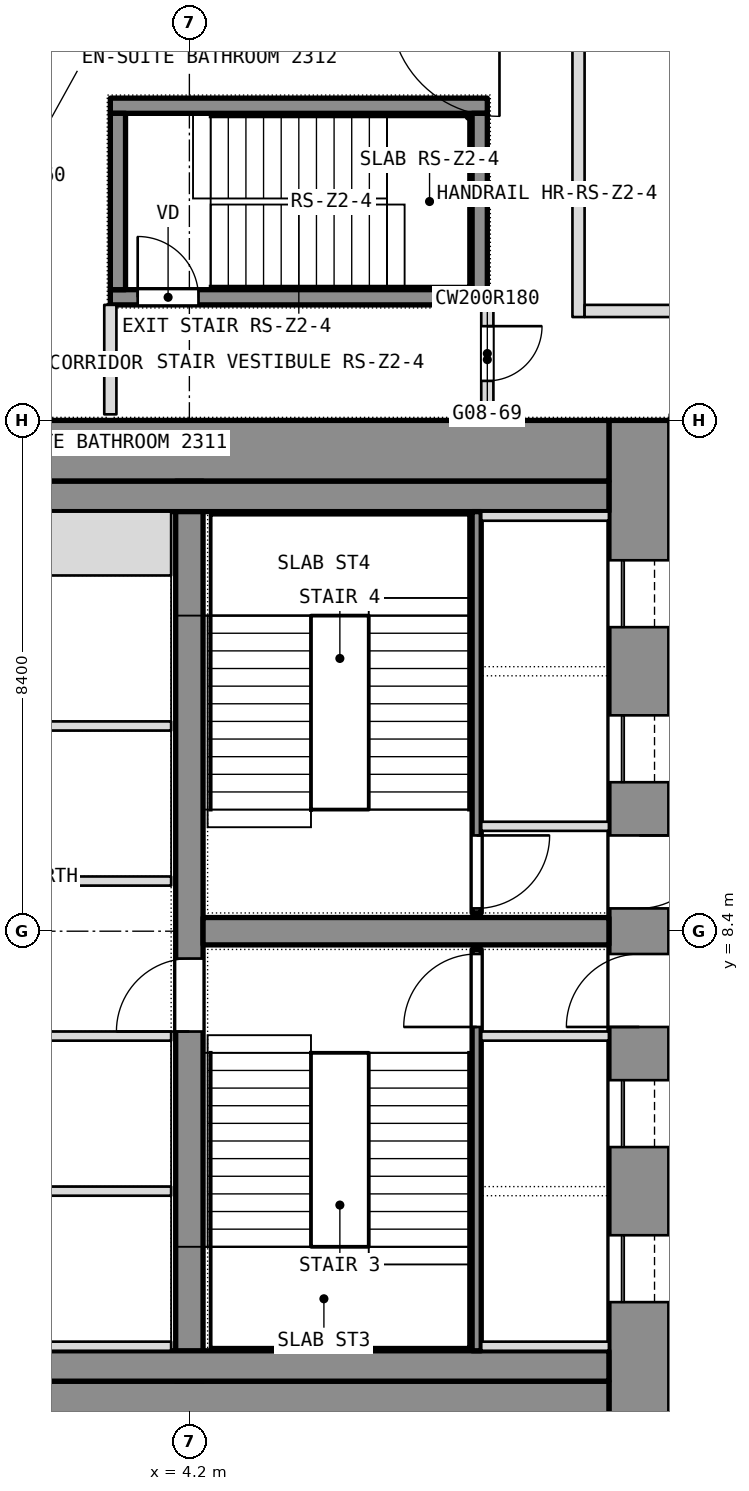
"""IFC4 building model, lengths in metres.
Left out: names, types, materials, properties, quantities, classifications, styles, units other than length and angle.
Written with IfcOpenShell. Run it as: python <this file> out.ifc"""

import sys

from ifc_helpers import new_model, si_unit, direction, frame, frame_2d, origin, place, context, subcontext, project, spatial, rectangle, extrude, element, fill, save


model = new_model("IFC4")
c1 = context("Model", 3, precision=1e-05, world=origin(), true_north=direction((0.0, 1.0)))
c2 = subcontext(c1, "Body", "Model", "MODEL_VIEW")
j1 = project(units=[si_unit("LENGTHUNIT", "METRE"), si_unit("PLANEANGLEUNIT", "RADIAN")], contexts=[c1])
p1 = place(None, origin())
s1 = spatial("IfcSite", under=j1, at=p1, CompositionType="ELEMENT")
p2 = place(p1, origin())
s2 = spatial("IfcBuilding", under=s1, at=p2, CompositionType="ELEMENT")
p3 = place(p2, frame((0.0, 0.0, 108.5)))
s3 = spatial("IfcBuildingStorey", under=s2, at=p3, CompositionType="ELEMENT", Elevation=108.5)
p4 = place(p3, frame((11.6, 0.0, 0.0), z_axis=(0.0, 0.0, 1.0), x_axis=(0.0, 1.0, 0.0)))
e1 = element("IfcWall", 1, at=p4, inside=s3, PredefinedType="SHEAR", context=c2, shape_type="SweptSolid", body=[
    extrude(rectangle(XDim=16.8, YDim=1.0, at=frame_2d((8.4, 0.0))), origin(), (0.0, 0.0, 1.0), 3.6),
])
p5 = place(p4, frame((2.3, 0.0, 0.0)))
e2 = element("IfcOpeningElement", 2, at=p5, cuts=e1, PredefinedType="OPENING", context=c2, shape_type="SweptSolid", body=[
    extrude(rectangle(XDim=1.1, YDim=2.1, at=frame_2d((0.55, 1.05))), frame((0.0, 0.5, 0.0), z_axis=(0.0, -1.0, 0.0), x_axis=(1.0, 0.0, 0.0)), (0.0, 0.0, 1.0), 1.0),
])
p6 = place(p4, frame((4.85, 0.0, 0.0)))
e3 = element("IfcOpeningElement", 3, at=p6, cuts=e1, PredefinedType="OPENING", context=c2, shape_type="SweptSolid", body=[
    extrude(rectangle(XDim=1.1, YDim=2.1, at=frame_2d((0.55, 1.05))), frame((0.0, 0.5, 0.0), z_axis=(0.0, -1.0, 0.0), x_axis=(1.0, 0.0, 0.0)), (0.0, 0.0, 1.0), 1.0),
])
p7 = place(p4, frame((6.825, 0.0, 0.0)))
e4 = element("IfcOpeningElement", 4, at=p7, cuts=e1, PredefinedType="OPENING", context=c2, shape_type="SweptSolid", body=[
    extrude(rectangle(XDim=1.2, YDim=2.1, at=frame_2d((0.6, 1.05))), frame((0.0, 0.5, 0.0), z_axis=(0.0, -1.0, 0.0), x_axis=(1.0, 0.0, 0.0)), (0.0, 0.0, 1.0), 1.0),
])
p8 = place(p4, frame((13.4, 0.0, 0.0)))
e5 = element("IfcOpeningElement", 5, at=p8, cuts=e1, PredefinedType="OPENING", context=c2, shape_type="SweptSolid", body=[
    extrude(rectangle(XDim=1.1, YDim=2.1, at=frame_2d((0.55, 1.05))), frame((0.0, 0.5, 0.0), z_axis=(0.0, -1.0, 0.0), x_axis=(1.0, 0.0, 0.0)), (0.0, 0.0, 1.0), 1.0),
])
p9 = place(p4, frame((10.85, 0.0, 0.0)))
e6 = element("IfcOpeningElement", 6, at=p9, cuts=e1, PredefinedType="OPENING", context=c2, shape_type="SweptSolid", body=[
    extrude(rectangle(XDim=1.1, YDim=2.1, at=frame_2d((0.55, 1.05))), frame((0.0, 0.5, 0.0), z_axis=(0.0, -1.0, 0.0), x_axis=(1.0, 0.0, 0.0)), (0.0, 0.0, 1.0), 1.0),
])
p10 = place(p4, frame((8.775, 0.0, 0.0)))
e7 = element("IfcOpeningElement", 7, at=p10, cuts=e1, PredefinedType="OPENING", context=c2, shape_type="SweptSolid", body=[
    extrude(rectangle(XDim=1.2, YDim=2.1, at=frame_2d((0.6, 1.05))), frame((0.0, 0.5, 0.0), z_axis=(0.0, -1.0, 0.0), x_axis=(1.0, 0.0, 0.0)), (0.0, 0.0, 1.0), 1.0),
])
for number, where, z_axis, x_axis in (
    (8, (-11.1, 0.5, 0.0), (0.0, 0.0, 1.0), (1.0, 0.0, 0.0)),
    (9, (-11.1, 16.3, 0.0), (0.0, 0.0, 1.0), (1.0, 0.0, 0.0)),
):
    element("IfcWall", number, at=place(p3, frame(where, z_axis=z_axis, x_axis=x_axis)), inside=s3, PredefinedType="SHEAR", context=c2, shape_type="SweptSolid", body=[
        extrude(rectangle(XDim=22.2, YDim=1.0, at=frame_2d((11.1, 0.0))), origin(), (0.0, 0.0, 1.0), 3.6),
    ])
p11 = place(p3, frame((4.2, 1.0, 0.0), z_axis=(0.0, 0.0, 1.0), x_axis=(0.0, 1.0, 0.0)))
e10 = element("IfcWall", 10, at=p11, inside=s3, PredefinedType="SHEAR", context=c2, shape_type="SweptSolid", body=[
    extrude(rectangle(XDim=14.8, YDim=0.45, at=frame_2d((7.4, 0.0))), origin(), (0.0, 0.0, 1.0), 3.6),
])
p12 = place(p11, frame((5.75, 0.0, 0.0)))
e11 = element("IfcOpeningElement", 11, at=p12, cuts=e10, PredefinedType="OPENING", context=c2, shape_type="SweptSolid", body=[
    extrude(rectangle(XDim=1.2, YDim=2.1, at=frame_2d((0.6, 1.05))), frame((0.0, 0.225, 0.0), z_axis=(0.0, -1.0, 0.0), x_axis=(1.0, 0.0, 0.0)), (0.0, 0.0, 1.0), 0.45),
])
p13 = place(p3, frame((4.425, 8.4, 0.0), z_axis=(0.0, 0.0, 1.0), x_axis=(1.0, 0.0, 0.0)))
e12 = element("IfcWall", 12, at=p13, inside=s3, PredefinedType="SHEAR", context=c2, shape_type="SweptSolid", body=[
    extrude(rectangle(XDim=6.675, YDim=0.45, at=frame_2d((3.337, 0.0))), origin(), (0.0, 0.0, 1.0), 3.6),
])
p14 = place(p3, frame((10.6, 18.5, 0.0), z_axis=(0.0, 0.0, 1.0), x_axis=(0.0, 1.0, 0.0)))
e13 = element("IfcWall", 13, at=p14, inside=s3, PredefinedType="PARTITIONING", context=c2, shape_type="SweptSolid", body=[
    extrude(rectangle(XDim=5.0, YDim=0.2, at=frame_2d((2.5, 0.0))), origin(), (0.0, 0.0, 1.0), 3.34),
])
p15 = place(p3, frame((9.1, 16.9, 0.0), z_axis=(0.0, 0.0, 1.0), x_axis=(0.0, 1.0, 0.0)))
e14 = element("IfcWall", 14, at=p15, inside=s3, PredefinedType="PARTITIONING", context=c2, shape_type="SweptSolid", body=[
    extrude(rectangle(XDim=1.8, YDim=0.2, at=frame_2d((0.9, 0.0))), origin(), (0.0, 0.0, 1.0), 3.34),
])
p16 = place(p15, frame((0.55, 0.0, 0.0)))
e15 = element("IfcOpeningElement", 15, at=p16, cuts=e14, PredefinedType="OPENING", context=c2, shape_type="SweptSolid", body=[
    extrude(rectangle(XDim=0.9, YDim=2.1, at=frame_2d((0.45, 1.05))), frame((0.0, 0.1, 0.0), z_axis=(0.0, -1.0, 0.0), x_axis=(1.0, 0.0, 0.0)), (0.0, 0.0, 1.0), 0.2),
])
p17 = place(p3, frame((2.9, 16.9, 0.0), z_axis=(0.0, 0.0, 1.0), x_axis=(0.0, 1.0, 0.0)))
e16 = element("IfcWall", 16, at=p17, inside=s3, PredefinedType="PARTITIONING", context=c2, shape_type="SweptSolid", body=[
    extrude(rectangle(XDim=1.8, YDim=0.2, at=frame_2d((0.9, 0.0))), origin(), (0.0, 0.0, 1.0), 3.34),
])
p18 = place(p3, frame((10.7, 18.6, 0.0), z_axis=(0.0, 0.0, 1.0), x_axis=(1.0, 0.0, 0.0)))
e17 = element("IfcWall", 17, at=p18, inside=s3, PredefinedType="PARTITIONING", context=c2, shape_type="SweptSolid", body=[
    extrude(rectangle(XDim=6.2, YDim=0.2, at=frame_2d((3.1, 0.0))), origin(), (0.0, 0.0, 1.0), 3.34),
])
p19 = place(p18, frame((2.3, 0.0, 0.0)))
e18 = element("IfcOpeningElement", 18, at=p19, cuts=e17, PredefinedType="OPENING", context=c2, shape_type="SweptSolid", body=[
    extrude(rectangle(XDim=1.0, YDim=2.1, at=frame_2d((0.5, 1.05))), frame((0.0, 0.1, 0.0), z_axis=(0.0, -1.0, 0.0), x_axis=(1.0, 0.0, 0.0)), (0.0, 0.0, 1.0), 0.2),
])
for number, where, z_axis, x_axis in (
    (19, (-11.1, 1.25, 0.0), (0.0, 0.0, 1.0), (1.0, 0.0, 0.0)),
    (20, (-11.1, 15.55, 0.0), (0.0, 0.0, 1.0), (1.0, 0.0, 0.0)),
):
    element("IfcWall", number, at=place(p3, frame(where, z_axis=z_axis, x_axis=x_axis)), inside=s3, PredefinedType="PARTITIONING", context=c2, shape_type="SweptSolid", body=[
        extrude(rectangle(XDim=22.2, YDim=0.5, at=frame_2d((11.1, 0.0))), origin(), (0.0, 0.0, 1.0), 3.34),
    ])
p20 = place(p3, frame((8.925, 1.5, 0.0), z_axis=(0.0, 0.0, 1.0), x_axis=(0.0, 1.0, 0.0)))
e21 = element("IfcWall", 21, at=p20, inside=s3, PredefinedType="SHEAR", context=c2, shape_type="SweptSolid", body=[
    extrude(rectangle(XDim=6.6, YDim=0.15, at=frame_2d((3.3, 0.0))), origin(), (0.0, 0.0, 1.0), 3.34),
])
p21 = place(p20, frame((5.325, 0.0, 0.0)))
e22 = element("IfcOpeningElement", 22, at=p21, cuts=e21, PredefinedType="OPENING", context=c2, shape_type="SweptSolid", body=[
    extrude(rectangle(XDim=1.2, YDim=2.1, at=frame_2d((0.6, 1.05))), frame((0.0, 0.075, 0.0), z_axis=(0.0, -1.0, 0.0), x_axis=(1.0, 0.0, 0.0)), (0.0, 0.0, 1.0), 0.15),
])
for number, where, z_axis, x_axis in (
    (23, (9.0, 6.675, 0.0), (0.0, 0.0, 1.0), (1.0, 0.0, 0.0)),
    (24, (9.0, 1.575, 0.0), (0.0, 0.0, 1.0), (1.0, 0.0, 0.0)),
):
    element("IfcWall", number, at=place(p3, frame(where, z_axis=z_axis, x_axis=x_axis)), inside=s3, PredefinedType="SHEAR", context=c2, shape_type="SweptSolid", body=[
        extrude(rectangle(XDim=2.1, YDim=0.15, at=frame_2d((1.05, 0.0))), origin(), (0.0, 0.0, 1.0), 3.6),
    ])
p22 = place(p3, frame((8.925, 8.7, 0.0), z_axis=(0.0, 0.0, 1.0), x_axis=(0.0, 1.0, 0.0)))
e25 = element("IfcWall", 25, at=p22, inside=s3, PredefinedType="SHEAR", context=c2, shape_type="SweptSolid", body=[
    extrude(rectangle(XDim=6.6, YDim=0.15, at=frame_2d((3.3, 0.0))), origin(), (0.0, 0.0, 1.0), 3.34),
])
p23 = place(p22, frame((0.075, 0.0, 0.0)))
e26 = element("IfcOpeningElement", 26, at=p23, cuts=e25, PredefinedType="OPENING", context=c2, shape_type="SweptSolid", body=[
    extrude(rectangle(XDim=1.2, YDim=2.1, at=frame_2d((0.6, 1.05))), frame((0.0, 0.075, 0.0), z_axis=(0.0, -1.0, 0.0), x_axis=(1.0, 0.0, 0.0)), (0.0, 0.0, 1.0), 0.15),
])
for number, where, z_axis, x_axis in (
    (27, (9.0, 10.125, 0.0), (0.0, 0.0, 1.0), (1.0, 0.0, 0.0)),
    (28, (9.0, 15.225, 0.0), (0.0, 0.0, 1.0), (1.0, 0.0, 0.0)),
):
    element("IfcWall", number, at=place(p3, frame(where, z_axis=z_axis, x_axis=x_axis)), inside=s3, PredefinedType="SHEAR", context=c2, shape_type="SweptSolid", body=[
        extrude(rectangle(XDim=2.1, YDim=0.15, at=frame_2d((1.05, 0.0))), origin(), (0.0, 0.0, 1.0), 3.6),
    ])
p24 = place(p3, frame((-3.9, 4.125, 0.0), z_axis=(0.0, 0.0, 1.0), x_axis=(1.0, 0.0, 0.0)))
e29 = element("IfcWall", 29, at=p24, inside=s3, PredefinedType="PARTITIONING", context=c2, shape_type="SweptSolid", body=[
    extrude(rectangle(XDim=7.8, YDim=0.15, at=frame_2d((3.9, 0.0))), origin(), (0.0, 0.0, 1.0), 3.34),
])
p25 = place(p24, frame((3.75, 0.0, 0.0)))
e30 = element("IfcOpeningElement", 30, at=p25, cuts=e29, PredefinedType="OPENING", context=c2, shape_type="SweptSolid", body=[
    extrude(rectangle(XDim=1.2, YDim=2.1, at=frame_2d((0.6, 1.05))), frame((0.0, 0.075, 0.0), z_axis=(0.0, -1.0, 0.0), x_axis=(1.0, 0.0, 0.0)), (0.0, 0.0, 1.0), 0.15),
])
p26 = place(p3, frame((-3.9, 11.775, 0.0), z_axis=(0.0, 0.0, 1.0), x_axis=(1.0, 0.0, 0.0)))
e31 = element("IfcWall", 31, at=p26, inside=s3, PredefinedType="PARTITIONING", context=c2, shape_type="SweptSolid", body=[
    extrude(rectangle(XDim=7.8, YDim=0.15, at=frame_2d((3.9, 0.0))), origin(), (0.0, 0.0, 1.0), 3.34),
])
p27 = place(p26, frame((3.3, 0.0, 0.0)))
e32 = element("IfcOpeningElement", 32, at=p27, cuts=e31, PredefinedType="OPENING", context=c2, shape_type="SweptSolid", body=[
    extrude(rectangle(XDim=1.2, YDim=2.1, at=frame_2d((0.6, 1.05))), frame((0.0, 0.075, 0.0), z_axis=(0.0, -1.0, 0.0), x_axis=(1.0, 0.0, 0.0)), (0.0, 0.0, 1.0), 0.15),
])
p28 = place(p3, frame((1.65, 1.575, 0.0), z_axis=(0.0, 0.0, 1.0), x_axis=(1.0, 0.0, 0.0)))
e33 = element("IfcWall", 33, at=p28, inside=s3, PredefinedType="SHEAR", context=c2, shape_type="SweptSolid", body=[
    extrude(rectangle(XDim=2.25, YDim=0.15, at=frame_2d((1.125, 0.0))), origin(), (0.0, 0.0, 1.0), 3.6),
])
p29 = place(p3, frame((1.65, 14.775, 0.0), z_axis=(0.0, 0.0, 1.0), x_axis=(1.0, 0.0, 0.0)))
e34 = element("IfcWall", 34, at=p29, inside=s3, PredefinedType="SHEAR", context=c2, shape_type="SweptSolid", body=[
    extrude(rectangle(XDim=2.25, YDim=1.05, at=frame_2d((1.125, 0.0))), origin(), (0.0, 0.0, 1.0), 3.6),
])
for number, where, z_axis, x_axis in (
    (35, (1.65, 6.675, 0.0), (0.0, 0.0, 1.0), (1.0, 0.0, 0.0)),
    (36, (1.65, 9.225, 0.0), (0.0, 0.0, 1.0), (1.0, 0.0, 0.0)),
):
    element("IfcWall", number, at=place(p3, frame(where, z_axis=z_axis, x_axis=x_axis)), inside=s3, PredefinedType="SHEAR", context=c2, shape_type="SweptSolid", body=[
        extrude(rectangle(XDim=2.25, YDim=0.15, at=frame_2d((1.125, 0.0))), origin(), (0.0, 0.0, 1.0), 3.6),
    ])
p30 = place(p3, frame((12.1, 16.8, 0.0), z_axis=(0.0, 0.0, 1.0), x_axis=(1.0, 0.0, 0.0)))
e37 = element("IfcWall", 37, at=p30, inside=s3, PredefinedType="PARTITIONING", context=c2, shape_type="SweptSolid", body=[
    extrude(rectangle(XDim=4.6, YDim=0.2, at=frame_2d((2.3, 0.0))), origin(), (0.0, 0.0, 1.0), 2.89),
])
p31 = place(p3, frame((2.9, 18.825, 0.1), z_axis=(0.0, 0.0, 1.0), x_axis=(1.0, 0.0, 0.0)))
e38 = element("IfcWall", 38, at=p31, inside=s3, PredefinedType="SHEAR", context=c2, shape_type="SweptSolid", body=[
    extrude(rectangle(XDim=6.2, YDim=0.25, at=frame_2d((3.1, 0.0))), origin(), (0.0, 0.0, 1.0), 3.6),
])
p32 = place(p31, frame((0.45, 0.0, 0.0)))
e39 = element("IfcOpeningElement", 39, at=p32, cuts=e38, PredefinedType="OPENING", context=c2, shape_type="SweptSolid", body=[
    extrude(rectangle(XDim=1.0, YDim=2.1, at=frame_2d((0.5, 1.05))), frame((0.0, 0.125, 0.0), z_axis=(0.0, -1.0, 0.0), x_axis=(1.0, 0.0, 0.0)), (0.0, 0.0, 1.0), 0.25),
])
p33 = place(p3, frame((2.9, 21.975, 0.1), z_axis=(0.0, 0.0, 1.0), x_axis=(1.0, 0.0, 0.0)))
e40 = element("IfcWall", 40, at=p33, inside=s3, PredefinedType="SHEAR", context=c2, shape_type="SweptSolid", body=[
    extrude(rectangle(XDim=6.2, YDim=0.25, at=frame_2d((3.1, 0.0))), origin(), (0.0, 0.0, 1.0), 3.6),
])
for number, where, z_axis, x_axis in (
    (41, (3.025, 18.95, 0.1), (0.0, 0.0, 1.0), (0.0, 1.0, 0.0)),
    (42, (8.975, 18.95, 0.1), (0.0, 0.0, 1.0), (0.0, 1.0, 0.0)),
):
    element("IfcWall", number, at=place(p3, frame(where, z_axis=z_axis, x_axis=x_axis)), inside=s3, PredefinedType="SHEAR", context=c2, shape_type="SweptSolid", body=[
        extrude(rectangle(XDim=2.9, YDim=0.25, at=frame_2d((1.45, 0.0))), origin(), (0.0, 0.0, 1.0), 3.6),
    ])
p34 = place(p16, origin())
e43 = element("IfcDoor", 43, at=p34, inside=s3, OperationType="SINGLE_SWING_RIGHT", PredefinedType="DOOR", context=c2, shape_type="SweptSolid", body=[
    extrude(rectangle(XDim=0.9, YDim=2.1, at=frame_2d((0.45, 1.05))), frame((0.0, 0.025, 0.0), z_axis=(0.0, -1.0, 0.0), x_axis=(1.0, 0.0, 0.0)), (0.0, 0.0, 1.0), 0.05),
])
fill(e15, e43)
p35 = place(p32, origin())
e44 = element("IfcDoor", 44, at=p35, inside=s3, OperationType="SINGLE_SWING_LEFT", PredefinedType="DOOR", context=c2, shape_type="SweptSolid", body=[
    extrude(rectangle(XDim=1.0, YDim=2.1, at=frame_2d((0.5, 1.05))), frame((0.0, 0.025, 0.0), z_axis=(0.0, -1.0, 0.0), x_axis=(1.0, 0.0, 0.0)), (0.0, 0.0, 1.0), 0.05),
])
fill(e39, e44)
p36 = place(p5, origin())
e45 = element("IfcDoor", 45, at=p36, inside=s3, OperationType="SLIDING_TO_LEFT", PredefinedType="DOOR", context=c2, shape_type="SweptSolid", body=[
    extrude(rectangle(XDim=1.1, YDim=2.1, at=frame_2d((0.55, 1.05))), frame((0.0, 0.025, 0.0), z_axis=(0.0, -1.0, 0.0), x_axis=(1.0, 0.0, 0.0)), (0.0, 0.0, 1.0), 0.05),
])
fill(e2, e45)
p37 = place(p6, origin())
e46 = element("IfcDoor", 46, at=p37, inside=s3, OperationType="SLIDING_TO_LEFT", PredefinedType="DOOR", context=c2, shape_type="SweptSolid", body=[
    extrude(rectangle(XDim=1.1, YDim=2.1, at=frame_2d((0.55, 1.05))), frame((0.0, 0.025, 0.0), z_axis=(0.0, -1.0, 0.0), x_axis=(1.0, 0.0, 0.0)), (0.0, 0.0, 1.0), 0.05),
])
fill(e3, e46)
p38 = place(p7, origin())
e47 = element("IfcDoor", 47, at=p38, inside=s3, OperationType="SINGLE_SWING_LEFT", PredefinedType="DOOR", context=c2, shape_type="SweptSolid", body=[
    extrude(rectangle(XDim=1.2, YDim=2.1, at=frame_2d((0.6, 1.05))), frame((0.0, 0.025, 0.0), z_axis=(0.0, -1.0, 0.0), x_axis=(1.0, 0.0, 0.0)), (0.0, 0.0, 1.0), 0.05),
])
fill(e4, e47)
p39 = place(p21, origin())
e48 = element("IfcDoor", 48, at=p39, inside=s3, OperationType="SINGLE_SWING_LEFT", PredefinedType="DOOR", context=c2, shape_type="SweptSolid", body=[
    extrude(rectangle(XDim=1.2, YDim=2.1, at=frame_2d((0.6, 1.05))), frame((0.0, 0.025, 0.0), z_axis=(0.0, -1.0, 0.0), x_axis=(1.0, 0.0, 0.0)), (0.0, 0.0, 1.0), 0.05),
])
fill(e22, e48)
p40 = place(p8, origin())
e49 = element("IfcDoor", 49, at=p40, inside=s3, OperationType="SLIDING_TO_LEFT", PredefinedType="DOOR", context=c2, shape_type="SweptSolid", body=[
    extrude(rectangle(XDim=1.1, YDim=2.1, at=frame_2d((0.55, 1.05))), frame((0.0, 0.025, 0.0), z_axis=(0.0, -1.0, 0.0), x_axis=(1.0, 0.0, 0.0)), (0.0, 0.0, 1.0), 0.05),
])
fill(e5, e49)
p41 = place(p9, origin())
e50 = element("IfcDoor", 50, at=p41, inside=s3, OperationType="SLIDING_TO_LEFT", PredefinedType="DOOR", context=c2, shape_type="SweptSolid", body=[
    extrude(rectangle(XDim=1.1, YDim=2.1, at=frame_2d((0.55, 1.05))), frame((0.0, 0.025, 0.0), z_axis=(0.0, -1.0, 0.0), x_axis=(1.0, 0.0, 0.0)), (0.0, 0.0, 1.0), 0.05),
])
fill(e6, e50)
p42 = place(p10, origin())
e51 = element("IfcDoor", 51, at=p42, inside=s3, OperationType="SINGLE_SWING_LEFT", PredefinedType="DOOR", context=c2, shape_type="SweptSolid", body=[
    extrude(rectangle(XDim=1.2, YDim=2.1, at=frame_2d((0.6, 1.05))), frame((0.0, 0.025, 0.0), z_axis=(0.0, -1.0, 0.0), x_axis=(1.0, 0.0, 0.0)), (0.0, 0.0, 1.0), 0.05),
])
fill(e7, e51)
p43 = place(p23, origin())
e52 = element("IfcDoor", 52, at=p43, inside=s3, OperationType="SINGLE_SWING_LEFT", PredefinedType="DOOR", context=c2, shape_type="SweptSolid", body=[
    extrude(rectangle(XDim=1.2, YDim=2.1, at=frame_2d((0.6, 1.05))), frame((0.0, 0.025, 0.0), z_axis=(0.0, -1.0, 0.0), x_axis=(1.0, 0.0, 0.0)), (0.0, 0.0, 1.0), 0.05),
])
fill(e26, e52)
p44 = place(p12, origin())
e53 = element("IfcDoor", 53, at=p44, inside=s3, OperationType="SINGLE_SWING_LEFT", PredefinedType="DOOR", context=c2, shape_type="SweptSolid", body=[
    extrude(rectangle(XDim=1.2, YDim=2.1, at=frame_2d((0.6, 1.05))), frame((0.0, 0.025, 0.0), z_axis=(0.0, -1.0, 0.0), x_axis=(1.0, 0.0, 0.0)), (0.0, 0.0, 1.0), 0.05),
])
fill(e11, e53)
save(model, sys.argv[1])
